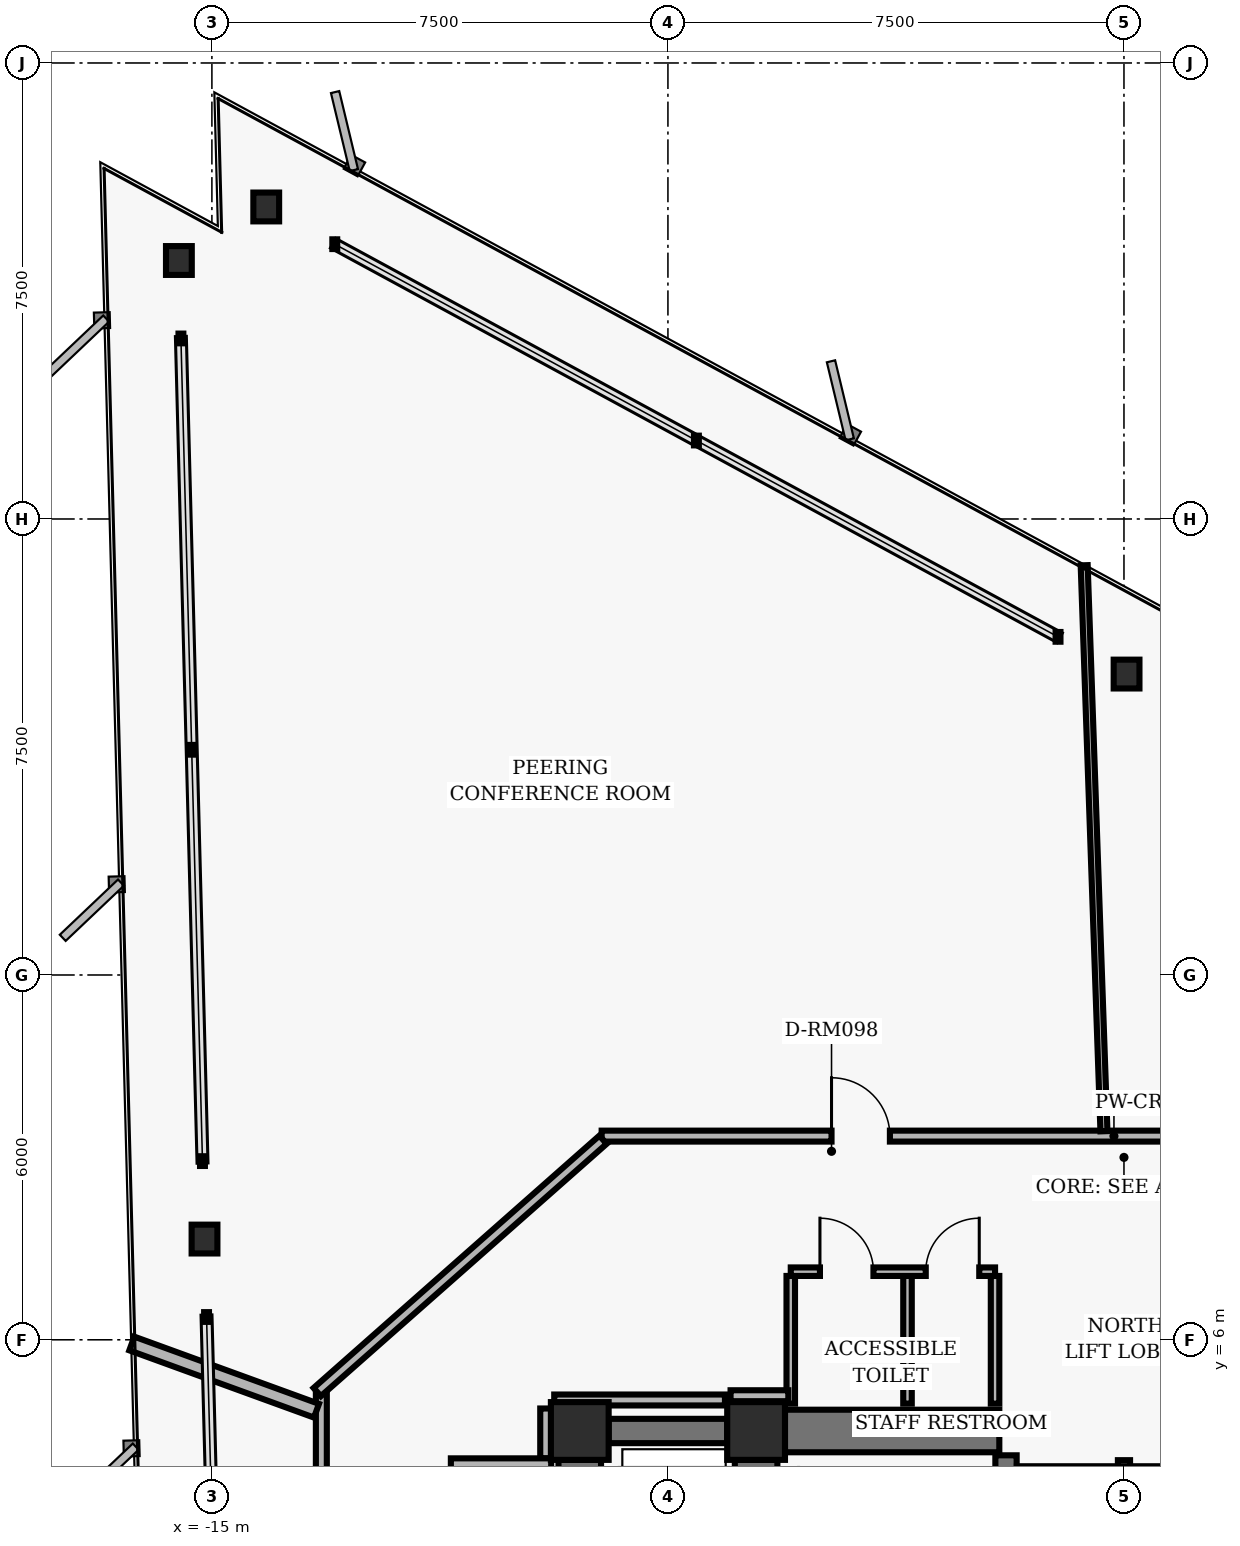
"""IFC4 building model, lengths in metres.
Left out: names, types, materials, properties, quantities, classifications, styles, units other than length and angle.
Written with IfcOpenShell. Run it as: python <this file> out.ifc"""

import sys

from ifc_helpers import new_model, si_unit, direction, frame, frame_2d, origin, origin_2d, place, context, subcontext, project, spatial, rectangle, hollow_rectangle, i_section, extrude, element, fill, save


model = new_model("IFC4")
c1 = context("Model", 3, precision=1e-05, world=origin(), true_north=direction((0.0, 1.0)))
c2 = subcontext(c1, "Body", "Model", "MODEL_VIEW")
j1 = project(units=[si_unit("LENGTHUNIT", "METRE"), si_unit("PLANEANGLEUNIT", "RADIAN")], contexts=[c1])
p1 = place(None, origin())
s1 = spatial("IfcSite", under=j1, at=p1, CompositionType="ELEMENT")
p2 = place(p1, origin())
s2 = spatial("IfcBuilding", under=s1, at=p2, CompositionType="ELEMENT")
p3 = place(p2, frame((0.0, 0.0, 39.04)))
s3 = spatial("IfcBuildingStorey", under=s2, at=p3, CompositionType="ELEMENT", Elevation=39.04)
for number, where, z_axis, x_axis in (
    (1, (-6.05, 4.5, 0.0), (0.0, 0.0, 1.0), (1.0, 0.0, 0.0)),
    (2, (-8.95, 4.5, 0.0), (0.0, 0.0, 1.0), (1.0, 0.0, 0.0)),
):
    element("IfcColumn", number, at=place(p3, frame(where, z_axis=z_axis, x_axis=x_axis)), inside=s3, PredefinedType="COLUMN", context=c2, shape_type="SweptSolid", body=[
        extrude(hollow_rectangle(XDim=0.95, YDim=0.95, WallThickness=0.06, InnerFilletRadius=0.02, OuterFilletRadius=0.04, at=origin_2d()), origin(), (0.0, 0.0, 1.0), 3.36),
    ])
p4 = place(p3, frame((-6.05, 0.475, 0.0), z_axis=(0.0, 0.0, 1.0), x_axis=(0.0, 1.0, 0.0)))
e3 = element("IfcWall", 3, at=p4, inside=s3, PredefinedType="SHEAR", context=c2, shape_type="SweptSolid", body=[
    extrude(rectangle(XDim=3.55, YDim=0.7, at=frame_2d((1.775, 0.0))), origin(), (0.0, 0.0, 1.0), 3.098),
])
p5 = place(p3, frame((-1.94, -4.1, 0.0), z_axis=(0.0, 0.0, 1.0), x_axis=(0.0, 1.0, 0.0)))
e4 = element("IfcWall", 4, at=p5, inside=s3, PredefinedType="SHEAR", context=c2, shape_type="SweptSolid", body=[
    extrude(rectangle(XDim=8.2, YDim=0.35, at=frame_2d((4.1, 0.0))), origin(), (0.0, 0.0, 1.0), 3.098),
])
p6 = place(p3, frame((-5.575, 4.5, 0.0), z_axis=(0.0, 0.0, 1.0), x_axis=(1.0, 0.0, 0.0)))
e5 = element("IfcWall", 5, at=p6, inside=s3, PredefinedType="SHEAR", context=c2, shape_type="SweptSolid", body=[
    extrude(rectangle(XDim=3.525, YDim=0.7, at=frame_2d((1.762, 0.0))), origin(), (0.0, 0.0, 1.0), 3.098),
])
p7 = place(p3, frame((-8.95, -3.825, 0.0), z_axis=(0.0, 0.0, 1.0), x_axis=(0.0, 1.0, 0.0)))
e6 = element("IfcWall", 6, at=p7, inside=s3, PredefinedType="SHEAR", context=c2, shape_type="SweptSolid", body=[
    extrude(rectangle(XDim=7.85, YDim=0.7, at=frame_2d((3.925, 0.0))), origin(), (0.0, 0.0, 1.0), 3.098),
])
p8 = place(p7, frame((0.55, 0.0, 0.0)))
e7 = element("IfcOpeningElement", 7, at=p8, cuts=e6, PredefinedType="OPENING", context=c2, shape_type="SweptSolid", body=[
    extrude(rectangle(XDim=1.06, YDim=2.04, at=frame_2d((0.53, 1.02))), frame((0.0, 0.36, 0.0), z_axis=(0.0, -1.0, 0.0), x_axis=(1.0, 0.0, 0.0)), (0.0, 0.0, 1.0), 0.72),
])
p9 = place(p7, frame((3.395, 0.0, 0.0)))
e8 = element("IfcOpeningElement", 8, at=p9, cuts=e6, PredefinedType="OPENING", context=c2, shape_type="SweptSolid", body=[
    extrude(rectangle(XDim=1.06, YDim=2.04, at=frame_2d((0.53, 1.02))), frame((0.0, 0.36, 0.0), z_axis=(0.0, -1.0, 0.0), x_axis=(1.0, 0.0, 0.0)), (0.0, 0.0, 1.0), 0.72),
])
p10 = place(p7, frame((6.23, 0.0, 0.0)))
e9 = element("IfcOpeningElement", 9, at=p10, cuts=e6, PredefinedType="OPENING", context=c2, shape_type="SweptSolid", body=[
    extrude(rectangle(XDim=1.06, YDim=2.04, at=frame_2d((0.53, 1.02))), frame((0.0, 0.36, 0.0), z_axis=(0.0, -1.0, 0.0), x_axis=(1.0, 0.0, 0.0)), (0.0, 0.0, 1.0), 0.72),
])
p11 = place(p3, frame((-8.475, 4.5, 0.0), z_axis=(0.0, 0.0, 1.0), x_axis=(1.0, 0.0, 0.0)))
e10 = element("IfcWall", 10, at=p11, inside=s3, PredefinedType="SHEAR", context=c2, shape_type="SweptSolid", body=[
    extrude(rectangle(XDim=1.95, YDim=0.4, at=frame_2d((0.975, 0.0))), origin(), (0.0, 0.0, 1.0), 3.098),
])
for number, where, z_axis, x_axis in (
    (11, (0.043, 16.949, 0.0), (0.0, 0.0, 1.0), (1.0, 0.0, 0.0)),
    (12, (-14.106, 24.632, 0.0), (0.0, 0.0, 1.0), (1.0, 0.0, 0.0)),
    (13, (-15.543, 23.751, 0.0), (0.0, 0.0, 1.0), (1.0, 0.0, 0.0)),
    (14, (-15.121, 7.657, 0.0), (0.0, 0.0, 1.0), (1.0, 0.0, 0.0)),
):
    element("IfcColumn", number, at=place(p3, frame(where, z_axis=z_axis, x_axis=x_axis)), inside=s3, PredefinedType="COLUMN", context=c2, shape_type="SweptSolid", body=[
        extrude(i_section(OverallWidth=0.424, OverallDepth=0.474, WebThickness=0.048, FlangeThickness=0.077, FilletRadius=0.025, at=origin_2d()), origin(), (0.0, 0.0, 1.0), 3.36),
    ])
p12 = place(p3, frame((0.0, 1.25, 0.0), z_axis=(0.0, 0.0, 1.0), x_axis=(0.0, 1.0, 0.0)))
e15 = element("IfcWall", 15, at=p12, inside=s3, PredefinedType="PARTITIONING", context=c2, shape_type="SweptSolid", body=[
    extrude(rectangle(XDim=2.77, YDim=0.2, at=frame_2d((1.385, 0.0))), origin(), (0.0, 0.0, 1.0), 3.073),
])
p13 = place(p3, frame((-1.76, 3.82, 0.0), z_axis=(0.0, 0.0, 1.0), x_axis=(1.0, 0.0, 0.0)))
e16 = element("IfcWall", 16, at=p13, inside=s3, PredefinedType="PARTITIONING", context=c2, shape_type="SweptSolid", body=[
    extrude(rectangle(XDim=3.52, YDim=0.2, at=frame_2d((1.76, 0.0))), origin(), (0.0, 0.0, 1.0), 3.073),
])
for number, where, z_axis, x_axis in (
    (17, (-5.48, 4.95, 0.0), (0.0, 0.0, 1.0), (0.0, 1.0, 0.0)),
    (18, (-3.56, 4.95, 0.0), (0.0, 0.0, 1.0), (0.0, 1.0, 0.0)),
    (19, (-2.12, 4.95, 0.0), (0.0, 0.0, 1.0), (0.0, 1.0, 0.0)),
):
    element("IfcWall", number, at=place(p3, frame(where, z_axis=z_axis, x_axis=x_axis)), inside=s3, PredefinedType="PARTITIONING", context=c2, shape_type="SweptSolid", body=[
        extrude(rectangle(XDim=2.1, YDim=0.14, at=frame_2d((1.05, 0.0))), origin(), (0.0, 0.0, 1.0), 3.073),
    ])
p14 = place(p3, frame((-5.48, 7.12, 0.0), z_axis=(0.0, 0.0, 1.0), x_axis=(1.0, 0.0, 0.0)))
e20 = element("IfcWall", 20, at=p14, inside=s3, PredefinedType="PARTITIONING", context=c2, shape_type="SweptSolid", body=[
    extrude(rectangle(XDim=3.36, YDim=0.14, at=frame_2d((1.68, 0.0))), origin(), (0.0, 0.0, 1.0), 3.073),
])
p15 = place(p14, frame((0.48, 0.0, 0.0)))
e21 = element("IfcOpeningElement", 21, at=p15, cuts=e20, PredefinedType="OPENING", context=c2, shape_type="SweptSolid", body=[
    extrude(rectangle(XDim=0.88, YDim=2.02, at=frame_2d((0.44, 1.01))), frame((0.0, 0.08, 0.0), z_axis=(0.0, -1.0, 0.0), x_axis=(1.0, 0.0, 0.0)), (0.0, 0.0, 1.0), 0.16),
])
p16 = place(p14, frame((2.22, 0.0, 0.0)))
e22 = element("IfcOpeningElement", 22, at=p16, cuts=e20, PredefinedType="OPENING", context=c2, shape_type="SweptSolid", body=[
    extrude(rectangle(XDim=0.88, YDim=2.02, at=frame_2d((0.44, 1.01))), frame((0.0, 0.08, 0.0), z_axis=(0.0, -1.0, 0.0), x_axis=(1.0, 0.0, 0.0)), (0.0, 0.0, 1.0), 0.16),
])
p17 = place(p3, frame((-8.59, 9.35, 0.0), z_axis=(0.0, 0.0, 1.0), x_axis=(1.0, 0.0, 0.0)))
e23 = element("IfcWall", 23, at=p17, inside=s3, PredefinedType="PARTITIONING", context=c2, shape_type="SweptSolid", body=[
    extrude(rectangle(XDim=17.18, YDim=0.18, at=frame_2d((8.59, 0.0))), origin(), (0.0, 0.0, 1.0), 2.587),
])
p18 = place(p17, frame((12.11, 0.0, 0.0)))
e24 = element("IfcOpeningElement", 24, at=p18, cuts=e23, PredefinedType="OPENING", context=c2, shape_type="SweptSolid", body=[
    extrude(rectangle(XDim=0.96, YDim=2.02, at=frame_2d((0.48, 1.01))), frame((0.0, 0.1, 0.0), z_axis=(0.0, -1.0, 0.0), x_axis=(1.0, 0.0, 0.0)), (0.0, 0.0, 1.0), 0.2),
])
p19 = place(p17, frame((3.781, 0.0, 0.0)))
e25 = element("IfcOpeningElement", 25, at=p19, cuts=e23, PredefinedType="OPENING", context=c2, shape_type="SweptSolid", body=[
    extrude(rectangle(XDim=0.96, YDim=2.02, at=frame_2d((0.48, 1.01))), frame((0.0, 0.1, 0.0), z_axis=(0.0, -1.0, 0.0), x_axis=(1.0, 0.0, 0.0)), (0.0, 0.0, 1.0), 0.2),
])
p20 = place(p3, frame((-13.2, -5.11, 0.0), z_axis=(0.0, 0.0, 1.0), x_axis=(0.0, 1.0, 0.0)))
e26 = element("IfcWall", 26, at=p20, inside=s3, PredefinedType="PARTITIONING", context=c2, shape_type="SweptSolid", body=[
    extrude(rectangle(XDim=10.22, YDim=0.18, at=frame_2d((5.11, 0.0))), origin(), (0.0, 0.0, 1.0), 2.587),
])
p21 = place(p20, frame((4.621, 0.0, 0.0)))
e27 = element("IfcOpeningElement", 27, at=p21, cuts=e26, PredefinedType="OPENING", context=c2, shape_type="SweptSolid", body=[
    extrude(rectangle(XDim=0.96, YDim=2.02, at=frame_2d((0.48, 1.01))), frame((0.0, 0.1, 0.0), z_axis=(0.0, -1.0, 0.0), x_axis=(1.0, 0.0, 0.0)), (0.0, 0.0, 1.0), 0.2),
])
p22 = place(p3, frame((-13.268, 5.14, 0.0), z_axis=(0.0, 0.0, 1.0), x_axis=(0.749626463267, 0.66186113768, 0.0)))
e28 = element("IfcWall", 28, at=p22, inside=s3, PredefinedType="PARTITIONING", context=c2, shape_type="SweptSolid", body=[
    extrude(rectangle(XDim=6.27, YDim=0.18, at=frame_2d((3.135, 0.0))), origin(), (0.0, 0.0, 1.0), 3.073),
])
p23 = place(p3, frame((-9.51, 4.87, 0.0), z_axis=(0.0, 0.0, 1.0), x_axis=(0.0, -1.0, 0.0)))
e29 = element("IfcWall", 29, at=p23, inside=s3, PredefinedType="PARTITIONING", context=c2, shape_type="SweptSolid", body=[
    extrude(rectangle(XDim=0.82, YDim=0.18, at=frame_2d((0.41, 0.0))), origin(), (0.0, 0.0, 1.0), 3.073),
])
p24 = place(p3, frame((-9.42, 3.96, 0.0), z_axis=(0.0, 0.0, 1.0), x_axis=(-1.0, 0.0, 0.0)))
e30 = element("IfcWall", 30, at=p24, inside=s3, PredefinedType="PARTITIONING", context=c2, shape_type="SweptSolid", body=[
    extrude(rectangle(XDim=1.65, YDim=0.18, at=frame_2d((0.825, 0.0))), origin(), (0.0, 0.0, 1.0), 3.073),
])
p25 = place(p3, frame((-5.52, 5.08, 0.0), z_axis=(0.0, 0.0, 1.0), x_axis=(-1.0, 0.0, 0.0)))
e31 = element("IfcWall", 31, at=p25, inside=s3, PredefinedType="PARTITIONING", context=c2, shape_type="SweptSolid", body=[
    extrude(rectangle(XDim=0.95, YDim=0.18, at=frame_2d((0.475, 0.0))), origin(), (0.0, 0.0, 1.0), 3.073),
])
p26 = place(p3, frame((-6.562, 5.01, 0.0), z_axis=(0.0, 0.0, 1.0), x_axis=(-1.0, 0.0, 0.0)))
e32 = element("IfcWall", 32, at=p26, inside=s3, PredefinedType="PARTITIONING", context=c2, shape_type="SweptSolid", body=[
    extrude(rectangle(XDim=2.808, YDim=0.18, at=frame_2d((1.404, 0.0))), origin(), (0.0, 0.0, 1.0), 3.073),
])
p27 = place(p3, frame((-0.329, 9.43, 0.0), z_axis=(0.0, 0.0, 1.0), x_axis=(-0.034885649993, 0.999391310461, 0.0)))
e33 = element("IfcWall", 33, at=p27, inside=s3, PredefinedType="MOVABLE", context=c2, shape_type="SweptSolid", body=[
    extrude(rectangle(XDim=9.315, YDim=0.115, at=frame_2d((4.657, 0.0))), origin(), (0.0, 0.0, 1.0), 3.073),
])
p28 = place(p3, frame((-13.28, 4.833, 0.0), z_axis=(0.0, 0.0, 1.0), x_axis=(-0.939702957278, 0.341991742712, 0.0)))
e34 = element("IfcWall", 34, at=p28, inside=s3, PredefinedType="PARTITIONING", context=c2, shape_type="SweptSolid", body=[
    extrude(rectangle(XDim=3.232, YDim=0.24, at=frame_2d((1.616, 0.0))), origin(), (0.0, 0.0, 1.0), 3.073),
])
p29 = place(p15, origin())
e35 = element("IfcDoor", 35, at=p29, inside=s3, OperationType="SINGLE_SWING_LEFT", PredefinedType="DOOR", context=c2, shape_type="SweptSolid", body=[
    extrude(rectangle(XDim=0.88, YDim=2.02, at=frame_2d((0.44, 1.01))), frame((0.0, 0.025, 0.0), z_axis=(0.0, -1.0, 0.0), x_axis=(1.0, 0.0, 0.0)), (0.0, 0.0, 1.0), 0.05),
])
fill(e21, e35)
p30 = place(p16, origin())
e36 = element("IfcDoor", 36, at=p30, inside=s3, OperationType="SINGLE_SWING_RIGHT", PredefinedType="DOOR", context=c2, shape_type="SweptSolid", body=[
    extrude(rectangle(XDim=0.88, YDim=2.02, at=frame_2d((0.44, 1.01))), frame((0.0, 0.025, 0.0), z_axis=(0.0, -1.0, 0.0), x_axis=(1.0, 0.0, 0.0)), (0.0, 0.0, 1.0), 0.05),
])
fill(e22, e36)
p31 = place(p19, origin())
e37 = element("IfcDoor", 37, at=p31, inside=s3, OperationType="SINGLE_SWING_LEFT", PredefinedType="DOOR", context=c2, shape_type="SweptSolid", body=[
    extrude(rectangle(XDim=0.96, YDim=2.02, at=frame_2d((0.48, 1.01))), frame((0.0, 0.025, 0.0), z_axis=(0.0, -1.0, 0.0), x_axis=(1.0, 0.0, 0.0)), (0.0, 0.0, 1.0), 0.05),
])
fill(e25, e37)
save(model, sys.argv[1])
